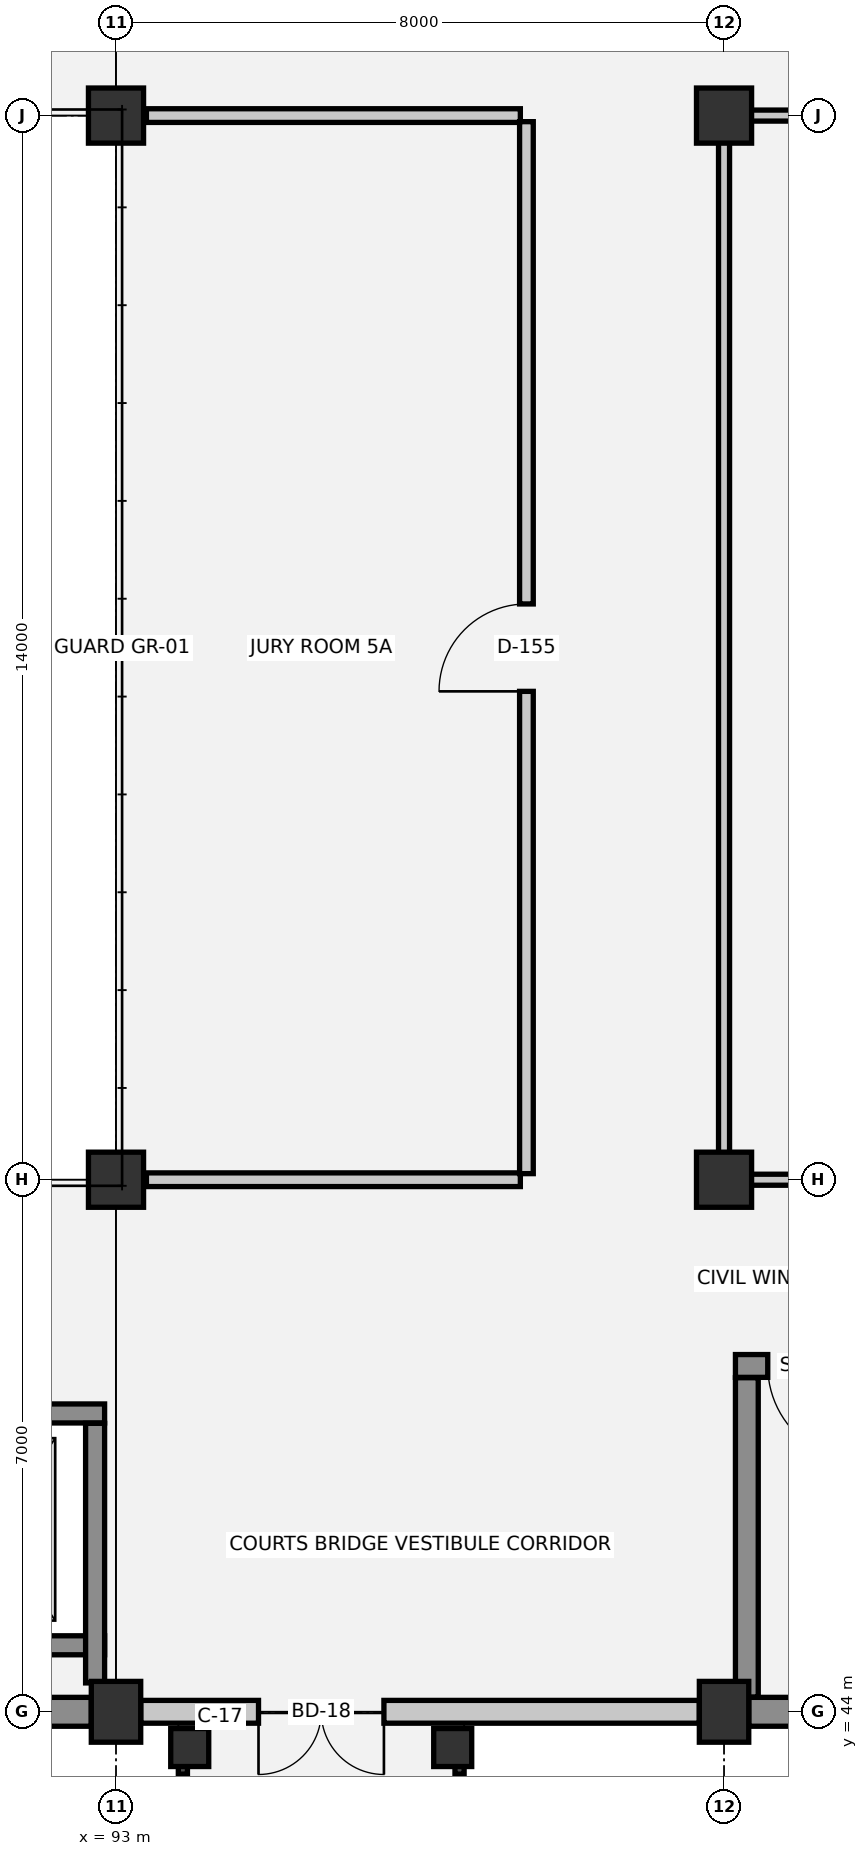
"""IFC4 building model, lengths in metres.
Left out: names, types, materials, properties, quantities, classifications, styles, units other than length and angle.
Written with IfcOpenShell. Run it as: python <this file> out.ifc"""

import sys

from ifc_helpers import new_model, si_unit, direction, frame, frame_2d, origin, origin_2d, place, context, subcontext, project, spatial, rectangle, extrude, element, fill, save


model = new_model("IFC4")
c1 = context("Model", 3, precision=1e-05, world=origin(), true_north=direction((0.0, 1.0)))
c2 = subcontext(c1, "Body", "Model", "MODEL_VIEW")
j1 = project(units=[si_unit("LENGTHUNIT", "METRE"), si_unit("PLANEANGLEUNIT", "RADIAN")], contexts=[c1])
p1 = place(None, origin())
s1 = spatial("IfcSite", under=j1, at=p1, CompositionType="ELEMENT")
p2 = place(p1, origin())
s2 = spatial("IfcBuilding", under=s1, at=p2, CompositionType="ELEMENT")
p3 = place(p2, frame((0.0, 0.0, 18.3)))
s3 = spatial("IfcBuildingStorey", under=s2, at=p3, CompositionType="ELEMENT", Elevation=18.3)
p4 = place(p3, frame((93.0, 44.0, 0.0), z_axis=(0.0, 0.0, 1.0), x_axis=(1.0, 0.0, 0.0)))
e1 = element("IfcColumn", 1, at=p4, inside=s3, PredefinedType="COLUMN", context=c2, shape_type="SweptSolid", body=[
    extrude(rectangle(XDim=0.65, YDim=0.8, at=origin_2d()), origin(), (0.0, 0.0, 1.0), 3.75),
])
for number, where, z_axis, x_axis in (
    (2, (93.0, 51.0, 0.0), (0.0, 0.0, 1.0), (1.0, 0.0, 0.0)),
    (3, (93.0, 65.0, 0.0), (0.0, 0.0, 1.0), (1.0, 0.0, 0.0)),
):
    element("IfcColumn", number, at=place(p3, frame(where, z_axis=z_axis, x_axis=x_axis)), inside=s3, PredefinedType="COLUMN", context=c2, shape_type="SweptSolid", body=[
        extrude(rectangle(XDim=0.725, YDim=0.725, at=origin_2d()), origin(), (0.0, 0.0, 1.0), 3.75),
    ])
p5 = place(p3, frame((101.0, 44.0, 0.0), z_axis=(0.0, 0.0, 1.0), x_axis=(1.0, 0.0, 0.0)))
e4 = element("IfcColumn", 4, at=p5, inside=s3, PredefinedType="COLUMN", context=c2, shape_type="SweptSolid", body=[
    extrude(rectangle(XDim=0.65, YDim=0.8, at=origin_2d()), origin(), (0.0, 0.0, 1.0), 3.75),
])
for number, where, z_axis, x_axis in (
    (5, (101.0, 51.0, 0.0), (0.0, 0.0, 1.0), (1.0, 0.0, 0.0)),
    (6, (101.0, 65.0, 0.0), (0.0, 0.0, 1.0), (1.0, 0.0, 0.0)),
):
    element("IfcColumn", number, at=place(p3, frame(where, z_axis=z_axis, x_axis=x_axis)), inside=s3, PredefinedType="COLUMN", context=c2, shape_type="SweptSolid", body=[
        extrude(rectangle(XDim=0.725, YDim=0.725, at=origin_2d()), origin(), (0.0, 0.0, 1.0), 3.75),
    ])
for number, where, z_axis, x_axis in (
    (7, (93.97, 43.53, 0.0), (0.0, 0.0, 1.0), (1.0, 0.0, 0.0)),
    (8, (97.43, 43.53, 0.0), (0.0, 0.0, 1.0), (1.0, 0.0, 0.0)),
):
    element("IfcColumn", number, at=place(p3, frame(where, z_axis=z_axis, x_axis=x_axis)), inside=s3, PredefinedType="COLUMN", context=c2, shape_type="SweptSolid", body=[
        extrude(rectangle(XDim=0.5, YDim=0.5, at=origin_2d()), origin(), (0.0, 0.0, 1.0), 3.52),
    ])
p6 = place(p3, frame((108.675, 44.0, 0.0), z_axis=(0.0, 0.0, 1.0), x_axis=(-1.0, 0.0, 0.0)))
e9 = element("IfcWall", 9, at=p6, inside=s3, PredefinedType="STANDARD", context=c2, shape_type="SweptSolid", body=[
    extrude(rectangle(XDim=7.35, YDim=0.38, at=frame_2d((3.675, 0.0))), origin(), (0.0, 0.0, 1.0), 2.6),
])
p7 = place(p3, frame((100.675, 44.0, 0.0), z_axis=(0.0, 0.0, 1.0), x_axis=(-1.0, 0.0, 0.0)))
e10 = element("IfcWall", 10, at=p7, inside=s3, PredefinedType="SOLIDWALL", context=c2, shape_type="SweptSolid", body=[
    extrude(rectangle(XDim=7.35, YDim=0.3, at=frame_2d((3.675, 0.0))), origin(), (0.0, 0.0, 1.0), 2.6),
])
p8 = place(p7, frame((4.15, 0.0, 0.0)))
e11 = element("IfcOpeningElement", 11, at=p8, cuts=e10, PredefinedType="OPENING", context=c2, shape_type="SweptSolid", body=[
    extrude(rectangle(XDim=1.65, YDim=2.2, at=frame_2d((0.825, 1.1))), frame((0.0, 0.16, 0.0), z_axis=(0.0, -1.0, 0.0), x_axis=(1.0, 0.0, 0.0)), (0.0, 0.0, 1.0), 0.32),
])
p9 = place(p3, frame((92.675, 44.0, 0.0), z_axis=(0.0, 0.0, 1.0), x_axis=(-1.0, 0.0, 0.0)))
e12 = element("IfcWall", 12, at=p9, inside=s3, PredefinedType="STANDARD", context=c2, shape_type="SweptSolid", body=[
    extrude(rectangle(XDim=7.35, YDim=0.38, at=frame_2d((3.675, 0.0))), origin(), (0.0, 0.0, 1.0), 2.6),
])
for number, where, z_axis, x_axis in (
    (13, (89.95, 44.875, 0.0), (0.0, 0.0, 1.0), (1.0, 0.0, 0.0)),
    (14, (92.85, 47.925, 0.0), (0.0, 0.0, 1.0), (-1.0, 0.0, 0.0)),
):
    element("IfcWall", number, at=place(p3, frame(where, z_axis=z_axis, x_axis=x_axis)), inside=s3, PredefinedType="SHEAR", context=c2, shape_type="SweptSolid", body=[
        extrude(rectangle(XDim=2.9, YDim=0.25, at=frame_2d((1.45, 0.0))), origin(), (0.0, 0.0, 1.0), 3.75),
    ])
p10 = place(p3, frame((92.725, 44.38, 0.0), z_axis=(0.0, 0.0, 1.0), x_axis=(0.0, 1.0, 0.0)))
e15 = element("IfcWall", 15, at=p10, inside=s3, PredefinedType="SHEAR", context=c2, shape_type="SweptSolid", body=[
    extrude(rectangle(XDim=3.415, YDim=0.25, at=frame_2d((1.708, 0.0))), origin(), (0.0, 0.0, 1.0), 3.75),
])
p11 = place(p3, frame((108.85, 48.55, 0.0), z_axis=(0.0, 0.0, 1.0), x_axis=(-1.0, 0.0, 0.0)))
e16 = element("IfcWall", 16, at=p11, inside=s3, PredefinedType="SHEAR", context=c2, shape_type="SweptSolid", body=[
    extrude(rectangle(XDim=7.7, YDim=0.3, at=frame_2d((3.85, 0.0))), origin(), (0.0, 0.0, 1.0), 3.47),
])
p12 = place(p11, frame((6.025, 0.0, 0.0)))
e17 = element("IfcOpeningElement", 17, at=p12, cuts=e16, PredefinedType="OPENING", context=c2, shape_type="SweptSolid", body=[
    extrude(rectangle(XDim=1.25, YDim=2.15, at=frame_2d((0.625, 1.075))), frame((0.0, 0.16, 0.0), z_axis=(0.0, -1.0, 0.0), x_axis=(1.0, 0.0, 0.0)), (0.0, 0.0, 1.0), 0.32),
])
p13 = place(p3, frame((101.3, 48.395, 0.0), z_axis=(0.0, 0.0, 1.0), x_axis=(0.0, -1.0, 0.0)))
e18 = element("IfcWall", 18, at=p13, inside=s3, PredefinedType="SHEAR", context=c2, shape_type="SweptSolid", body=[
    extrude(rectangle(XDim=4.2, YDim=0.3, at=frame_2d((2.1, 0.0))), origin(), (0.0, 0.0, 1.0), 3.47),
])
p14 = place(p3, frame((93.4, 51.0, 0.0), z_axis=(0.0, 0.0, 1.0), x_axis=(1.0, 0.0, 0.0)))
e19 = element("IfcWall", 19, at=p14, inside=s3, PredefinedType="PARTITIONING", context=c2, shape_type="SweptSolid", body=[
    extrude(rectangle(XDim=4.92, YDim=0.18, at=frame_2d((2.46, 0.0))), origin(), (0.0, 0.0, 1.0), 2.82),
])
p15 = place(p3, frame((101.08, 51.0, 0.0), z_axis=(0.0, 0.0, 1.0), x_axis=(1.0, 0.0, 0.0)))
e20 = element("IfcWall", 20, at=p15, inside=s3, PredefinedType="PARTITIONING", context=c2, shape_type="SweptSolid", body=[
    extrude(rectangle(XDim=22.84, YDim=0.145, at=frame_2d((11.42, 0.0))), origin(), (0.0, 0.0, 1.0), 2.82),
])
p16 = place(p15, frame((10.52, 0.0, 0.0)))
e21 = element("IfcOpeningElement", 21, at=p16, cuts=e20, PredefinedType="OPENING", context=c2, shape_type="SweptSolid", body=[
    extrude(rectangle(XDim=1.8, YDim=2.3, at=frame_2d((0.9, 1.15))), frame((0.0, 0.083, 0.0), z_axis=(0.0, -1.0, 0.0), x_axis=(1.0, 0.0, 0.0)), (0.0, 0.0, 1.0), 0.165),
])
p17 = place(p3, frame((93.4, 65.0, 0.0), z_axis=(0.0, 0.0, 1.0), x_axis=(1.0, 0.0, 0.0)))
e22 = element("IfcWall", 22, at=p17, inside=s3, PredefinedType="PARTITIONING", context=c2, shape_type="SweptSolid", body=[
    extrude(rectangle(XDim=4.92, YDim=0.18, at=frame_2d((2.46, 0.0))), origin(), (0.0, 0.0, 1.0), 2.82),
])
p18 = place(p3, frame((101.08, 65.0, 0.0), z_axis=(0.0, 0.0, 1.0), x_axis=(1.0, 0.0, 0.0)))
e23 = element("IfcWall", 23, at=p18, inside=s3, PredefinedType="PARTITIONING", context=c2, shape_type="SweptSolid", body=[
    extrude(rectangle(XDim=22.84, YDim=0.145, at=frame_2d((11.42, 0.0))), origin(), (0.0, 0.0, 1.0), 2.82),
])
p19 = place(p3, frame((98.4, 51.08, 0.0), z_axis=(0.0, 0.0, 1.0), x_axis=(0.0, 1.0, 0.0)))
e24 = element("IfcWall", 24, at=p19, inside=s3, PredefinedType="PARTITIONING", context=c2, shape_type="SweptSolid", body=[
    extrude(rectangle(XDim=13.84, YDim=0.18, at=frame_2d((6.92, 0.0))), origin(), (0.0, 0.0, 1.0), 3.39),
])
p20 = place(p19, frame((6.345, 0.0, 0.0)))
e25 = element("IfcOpeningElement", 25, at=p20, cuts=e24, PredefinedType="OPENING", context=c2, shape_type="SweptSolid", body=[
    extrude(rectangle(XDim=1.15, YDim=2.2, at=frame_2d((0.575, 1.1))), frame((0.0, 0.1, 0.0), z_axis=(0.0, -1.0, 0.0), x_axis=(1.0, 0.0, 0.0)), (0.0, 0.0, 1.0), 0.2),
])
p21 = place(p3, frame((101.0, 51.08, 0.0), z_axis=(0.0, 0.0, 1.0), x_axis=(0.0, 1.0, 0.0)))
e26 = element("IfcWall", 26, at=p21, inside=s3, PredefinedType="PARTITIONING", context=c2, shape_type="SweptSolid", body=[
    extrude(rectangle(XDim=13.84, YDim=0.145, at=frame_2d((6.92, 0.0))), origin(), (0.0, 0.0, 1.0), 2.62),
])
p22 = place(p8, origin())
e27 = element("IfcDoor", 27, at=p22, inside=s3, OperationType="DOUBLE_DOOR_SINGLE_SWING", PredefinedType="DOOR", context=c2, shape_type="SweptSolid", body=[
    extrude(rectangle(XDim=1.65, YDim=2.2, at=frame_2d((0.825, 1.1))), frame((0.0, 0.025, 0.0), z_axis=(0.0, -1.0, 0.0), x_axis=(1.0, 0.0, 0.0)), (0.0, 0.0, 1.0), 0.05),
])
fill(e11, e27)
p23 = place(p12, origin())
e28 = element("IfcDoor", 28, at=p23, inside=s3, OperationType="SINGLE_SWING_LEFT", PredefinedType="DOOR", context=c2, shape_type="SweptSolid", body=[
    extrude(rectangle(XDim=1.25, YDim=2.15, at=frame_2d((0.625, 1.075))), frame((0.0, 0.025, 0.0), z_axis=(0.0, -1.0, 0.0), x_axis=(1.0, 0.0, 0.0)), (0.0, 0.0, 1.0), 0.05),
])
fill(e17, e28)
p24 = place(p20, origin())
e29 = element("IfcDoor", 29, at=p24, inside=s3, OperationType="SINGLE_SWING_LEFT", PredefinedType="DOOR", context=c2, shape_type="SweptSolid", body=[
    extrude(rectangle(XDim=1.15, YDim=2.2, at=frame_2d((0.575, 1.1))), frame((0.0, 0.025, 0.0), z_axis=(0.0, -1.0, 0.0), x_axis=(1.0, 0.0, 0.0)), (0.0, 0.0, 1.0), 0.05),
])
fill(e25, e29)
save(model, sys.argv[1])
